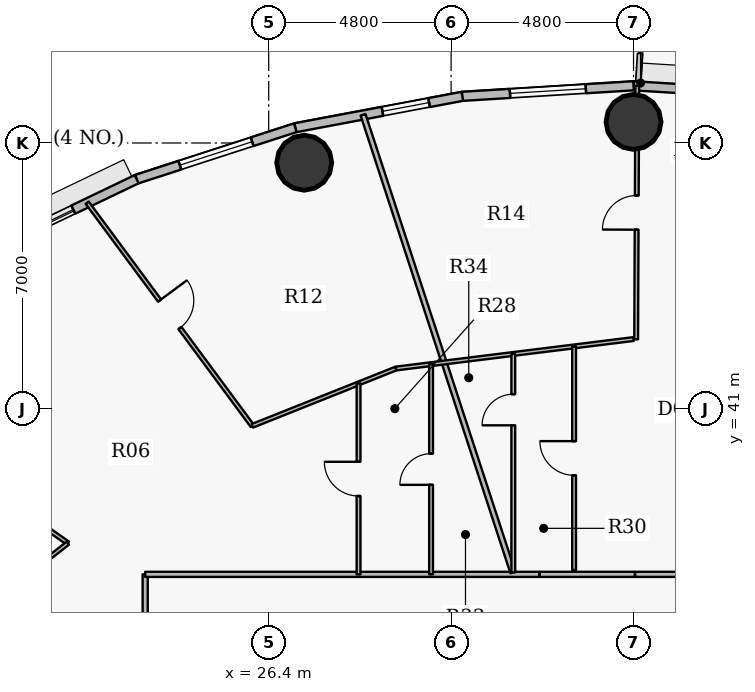
"""IFC4 building model, lengths in metres.
Left out: names, types, materials, properties, quantities, classifications, styles, units other than length and angle.
Written with IfcOpenShell. Run it as: python <this file> out.ifc"""

import sys

from ifc_helpers import new_model, si_unit, direction, frame, frame_2d, origin, origin_2d, place, context, subcontext, project, spatial, rectangle, hollow_circle, extrude, source, transform, mapped, element, fill, save


model = new_model("IFC4")
c1 = context("Model", 3, precision=1e-05, world=origin(), true_north=direction((0.0, 1.0)))
c2 = subcontext(c1, "Body", "Model", "MODEL_VIEW")
j1 = project(units=[si_unit("LENGTHUNIT", "METRE"), si_unit("PLANEANGLEUNIT", "RADIAN")], contexts=[c1])
p1 = place(None, origin())
s1 = spatial("IfcSite", under=j1, at=p1, CompositionType="ELEMENT")
p2 = place(p1, origin())
s2 = spatial("IfcBuilding", under=s1, at=p2, CompositionType="ELEMENT")
p3 = place(p2, frame((0.0, 0.0, 108.45)))
s3 = spatial("IfcBuildingStorey", under=s2, at=p3, CompositionType="ELEMENT", Elevation=108.45)
for number, where, z_axis, x_axis in (
    (1, (36.0, 48.555, 0.0), (0.0, 0.0, 1.0), (1.0, 0.0, 0.0)),
    (2, (27.334, 47.481, 0.0), (0.0, 0.0, 1.0), (1.0, 0.0, 0.0)),
):
    element("IfcColumn", number, at=place(p3, frame(where, z_axis=z_axis, x_axis=x_axis)), inside=s3, PredefinedType="COLUMN", context=c2, shape_type="SweptSolid", body=[
        extrude(hollow_circle(Radius=0.725, WallThickness=0.042, at=origin_2d()), origin(), (0.0, 0.0, 1.0), 3.75),
    ])
p4 = place(p3, frame((36.0, 49.505, 0.0), z_axis=(0.0, 0.0, 1.0), x_axis=(0.998107531589, -0.061492726276, 0.0)))
e3 = element("IfcWall", 3, at=p4, inside=s3, PredefinedType="SOLIDWALL", context=c2, shape_type="SweptSolid", body=[
    extrude(rectangle(XDim=4.514, YDim=0.24, at=frame_2d((2.257, 0.0))), origin(), (0.0, 0.0, 1.0), 3.5),
])
p5 = place(p4, frame((1.732, 0.0, 0.0)))
e4 = element("IfcOpeningElement", 4, at=p5, cuts=e3, PredefinedType="OPENING", context=c2, shape_type="SweptSolid", body=[
    extrude(rectangle(XDim=1.05, YDim=2.15, at=origin_2d()), frame((0.525, 0.13, 1.075), z_axis=(0.0, -1.0, 0.0), x_axis=(1.0, 0.0, 0.0)), (0.0, 0.0, 1.0), 0.26),
])
p6 = place(p3, frame((31.494, 49.227, 0.0), z_axis=(0.0, 0.0, 1.0), x_axis=(0.998107531589, 0.061492726276, 0.0)))
e5 = element("IfcWall", 5, at=p6, inside=s3, PredefinedType="SOLIDWALL", context=c2, shape_type="SweptSolid", body=[
    extrude(rectangle(XDim=4.514, YDim=0.24, at=frame_2d((2.257, 0.0))), origin(), (0.0, 0.0, 1.0), 3.5),
])
p7 = place(p6, frame((1.257, 0.0, 0.9)))
e6 = element("IfcOpeningElement", 6, at=p7, cuts=e5, PredefinedType="OPENING", context=c2, shape_type="SweptSolid", body=[
    extrude(rectangle(XDim=2.0, YDim=1.75, at=origin_2d()), frame((1.0, 0.13, 0.875), z_axis=(0.0, -1.0, 0.0), x_axis=(1.0, 0.0, 0.0)), (0.0, 0.0, 1.0), 0.26),
])
p8 = place(p3, frame((27.1, 48.401, 0.0), z_axis=(0.0, 0.0, 1.0), x_axis=(0.982789252177, 0.184730305596, 0.0)))
e7 = element("IfcWall", 7, at=p8, inside=s3, PredefinedType="SOLIDWALL", context=c2, shape_type="SweptSolid", body=[
    extrude(rectangle(XDim=4.471, YDim=0.24, at=frame_2d((2.235, 0.0))), origin(), (0.0, 0.0, 1.0), 3.5),
])
p9 = place(p8, frame((2.333, 0.0, 0.9)))
e8 = element("IfcOpeningElement", 8, at=p9, cuts=e7, PredefinedType="OPENING", context=c2, shape_type="SweptSolid", body=[
    extrude(rectangle(XDim=1.25, YDim=1.65, at=origin_2d()), frame((0.625, 0.13, 0.825), z_axis=(0.0, -1.0, 0.0), x_axis=(1.0, 0.0, 0.0)), (0.0, 0.0, 1.0), 0.26),
])
p10 = place(p3, frame((22.926, 47.047, 0.0), z_axis=(0.0, 0.0, 1.0), x_axis=(0.951211346073, 0.308540070495, 0.0)))
e9 = element("IfcWall", 9, at=p10, inside=s3, PredefinedType="SOLIDWALL", context=c2, shape_type="SweptSolid", body=[
    extrude(rectangle(XDim=4.388, YDim=0.24, at=frame_2d((2.194, 0.0))), origin(), (0.0, 0.0, 1.0), 3.5),
])
p11 = place(p10, frame((1.194, 0.0, 0.9)))
e10 = element("IfcOpeningElement", 10, at=p11, cuts=e9, PredefinedType="OPENING", context=c2, shape_type="SweptSolid", body=[
    extrude(rectangle(XDim=2.0, YDim=1.75, at=origin_2d()), frame((1.0, 0.13, 0.875), z_axis=(0.0, -1.0, 0.0), x_axis=(1.0, 0.0, 0.0)), (0.0, 0.0, 1.0), 0.26),
])
p12 = place(p3, frame((19.075, 45.199, 0.0), z_axis=(0.0, 0.0, 1.0), x_axis=(0.901589935876, 0.432591709962, 0.0)))
e11 = element("IfcWall", 11, at=p12, inside=s3, PredefinedType="SOLIDWALL", context=c2, shape_type="SweptSolid", body=[
    extrude(rectangle(XDim=4.272, YDim=0.24, at=frame_2d((2.136, 0.0))), origin(), (0.0, 0.0, 1.0), 3.5),
])
p13 = place(p12, frame((0.822, 0.0, 0.9)))
e12 = element("IfcOpeningElement", 12, at=p13, cuts=e11, PredefinedType="OPENING", context=c2, shape_type="SweptSolid", body=[
    extrude(rectangle(XDim=1.6, YDim=1.75, at=origin_2d()), frame((0.8, 0.13, 0.875), z_axis=(0.0, -1.0, 0.0), x_axis=(1.0, 0.0, 0.0)), (0.0, 0.0, 1.0), 0.26),
])
p14 = place(p3, frame((14.661, 42.011, 0.0), z_axis=(0.0, 0.0, 1.0), x_axis=(0.817899711196, -0.575360810645, 0.0)))
e13 = element("IfcWall", 13, at=p14, inside=s3, PredefinedType="PARTITIONING", context=c2, shape_type="SweptSolid", body=[
    extrude(rectangle(XDim=7.891, YDim=0.1, at=frame_2d((3.945, 0.0))), origin(), (0.0, 0.0, 1.0), 2.935),
])
p15 = place(p14, frame((3.495, 0.0, 0.0)))
e14 = element("IfcOpeningElement", 14, at=p15, cuts=e13, PredefinedType="OPENING", context=c2, shape_type="SweptSolid", body=[
    extrude(rectangle(XDim=0.9, YDim=2.1, at=origin_2d()), frame((0.45, 0.06, 1.05), z_axis=(0.0, -1.0, 0.0), x_axis=(1.0, 0.0, 0.0)), (0.0, 0.0, 1.0), 0.12),
])
p16 = place(p3, frame((19.634, 36.311, 0.0), z_axis=(0.0, 0.0, 1.0), x_axis=(0.787307829703, 0.616560119768, 0.0)))
e15 = element("IfcWall", 15, at=p16, inside=s3, PredefinedType="PARTITIONING", context=c2, shape_type="SweptSolid", body=[
    extrude(rectangle(XDim=1.882, YDim=0.1, at=frame_2d((0.941, 0.0))), origin(), (0.0, 0.0, 1.0), 3.5),
])
p17 = place(p3, frame((21.624, 46.428, 0.0), z_axis=(0.0, 0.0, 1.0), x_axis=(0.594804555611, -0.803870350631, 0.0)))
e16 = element("IfcWall", 16, at=p17, inside=s3, PredefinedType="PARTITIONING", context=c2, shape_type="SweptSolid", body=[
    extrude(rectangle(XDim=7.303, YDim=0.1, at=frame_2d((3.652, 0.0))), origin(), (0.0, 0.0, 1.0), 2.935),
])
p18 = place(p17, frame((3.202, 0.0, 0.0)))
e17 = element("IfcOpeningElement", 17, at=p18, cuts=e16, PredefinedType="OPENING", context=c2, shape_type="SweptSolid", body=[
    extrude(rectangle(XDim=0.9, YDim=2.1, at=origin_2d()), frame((0.45, 0.06, 1.05), z_axis=(0.0, -1.0, 0.0), x_axis=(1.0, 0.0, 0.0)), (0.0, 0.0, 1.0), 0.12),
])
p19 = place(p3, frame((23.15, 17.35, 0.0), z_axis=(0.0, 0.0, 1.0), x_axis=(0.0, 1.0, 0.0)))
e18 = element("IfcWall", 18, at=p19, inside=s3, PredefinedType="PARTITIONING", context=c2, shape_type="SweptSolid", body=[
    extrude(rectangle(XDim=19.3, YDim=0.135, at=frame_2d((9.65, 0.0))), origin(), (0.0, 0.0, 1.0), 2.935),
])
p20 = place(p19, frame((15.889, 0.0, 0.0)))
e19 = element("IfcOpeningElement", 19, at=p20, cuts=e18, PredefinedType="OPENING", context=c2, shape_type="SweptSolid", body=[
    extrude(rectangle(XDim=1.0, YDim=2.15, at=origin_2d()), frame((0.5, 0.078, 1.075), z_axis=(0.0, -1.0, 0.0), x_axis=(1.0, 0.0, 0.0)), (0.0, 0.0, 1.0), 0.155),
])
p21 = place(p19, frame((6.279, 0.0, 0.0)))
e20 = element("IfcOpeningElement", 20, at=p21, cuts=e18, PredefinedType="OPENING", context=c2, shape_type="SweptSolid", body=[
    extrude(rectangle(XDim=1.0, YDim=2.15, at=origin_2d()), frame((0.5, 0.078, 1.075), z_axis=(0.0, -1.0, 0.0), x_axis=(1.0, 0.0, 0.0)), (0.0, 0.0, 1.0), 0.155),
])
p22 = place(p3, frame((23.15, 36.65, 0.0), z_axis=(0.0, 0.0, 1.0), x_axis=(1.0, 0.0, 0.0)))
e21 = element("IfcWall", 21, at=p22, inside=s3, PredefinedType="PARTITIONING", context=c2, shape_type="SweptSolid", body=[
    extrude(rectangle(XDim=10.373, YDim=0.135, at=frame_2d((5.187, 0.0))), origin(), (0.0, 0.0, 1.0), 2.935),
])
p23 = place(p3, frame((25.968, 40.557, 0.0), z_axis=(0.0, 0.0, 1.0), x_axis=(0.928807252466, 0.37056320347, 0.0)))
e22 = element("IfcWall", 22, at=p23, inside=s3, PredefinedType="PARTITIONING", context=c2, shape_type="SweptSolid", body=[
    extrude(rectangle(XDim=4.07, YDim=0.1, at=frame_2d((2.035, 0.0))), origin(), (0.0, 0.0, 1.0), 2.935),
])
p24 = place(p3, frame((28.764, 36.65, 0.0), z_axis=(0.0, 0.0, 1.0), x_axis=(0.0, 1.0, 0.0)))
e23 = element("IfcWall", 23, at=p24, inside=s3, PredefinedType="PARTITIONING", context=c2, shape_type="SweptSolid", body=[
    extrude(rectangle(XDim=5.023, YDim=0.1, at=frame_2d((2.511, 0.0))), origin(), (0.0, 0.0, 1.0), 3.5),
])
p25 = place(p24, frame((2.062, 0.0, 0.0)))
e24 = element("IfcOpeningElement", 24, at=p25, cuts=e23, PredefinedType="OPENING", context=c2, shape_type="SweptSolid", body=[
    extrude(rectangle(XDim=0.9, YDim=2.1, at=origin_2d()), frame((0.45, 0.06, 1.05), z_axis=(0.0, -1.0, 0.0), x_axis=(1.0, 0.0, 0.0)), (0.0, 0.0, 1.0), 0.12),
])
p26 = place(p3, frame((28.883, 48.741, 0.0), z_axis=(0.0, 0.0, 1.0), x_axis=(0.311090320612, -0.95038035145, 0.0)))
e25 = element("IfcWall", 25, at=p26, inside=s3, PredefinedType="PARTITIONING", context=c2, shape_type="SweptSolid", body=[
    extrude(rectangle(XDim=12.671, YDim=0.135, at=frame_2d((6.335, 0.0))), origin(), (0.0, 0.0, 1.0), 2.935),
])
p27 = place(p3, frame((29.749, 42.066, 0.0), z_axis=(0.0, 0.0, 1.0), x_axis=(0.992395485088, 0.123090215599, 0.0)))
e26 = element("IfcWall", 26, at=p27, inside=s3, PredefinedType="PARTITIONING", context=c2, shape_type="SweptSolid", body=[
    extrude(rectangle(XDim=6.299, YDim=0.1, at=frame_2d((3.15, 0.0))), origin(), (0.0, 0.0, 1.0), 2.935),
])
p28 = place(p3, frame((30.673, 36.65, 0.0), z_axis=(0.0, 0.0, 1.0), x_axis=(0.0, 1.0, 0.0)))
e27 = element("IfcWall", 27, at=p28, inside=s3, PredefinedType="PARTITIONING", context=c2, shape_type="SweptSolid", body=[
    extrude(rectangle(XDim=5.53, YDim=0.1, at=frame_2d((2.765, 0.0))), origin(), (0.0, 0.0, 1.0), 2.935),
])
p29 = place(p28, frame((2.355, 0.0, 0.0)))
e28 = element("IfcOpeningElement", 28, at=p29, cuts=e27, PredefinedType="OPENING", context=c2, shape_type="SweptSolid", body=[
    extrude(rectangle(XDim=0.82, YDim=2.1, at=origin_2d()), frame((0.41, 0.06, 1.05), z_axis=(0.0, -1.0, 0.0), x_axis=(1.0, 0.0, 0.0)), (0.0, 0.0, 1.0), 0.12),
])
p30 = place(p3, frame((32.836, 36.701, 0.0), z_axis=(0.0, 0.0, 1.0), x_axis=(0.0, 1.0, 0.0)))
e29 = element("IfcWall", 29, at=p30, inside=s3, PredefinedType="PARTITIONING", context=c2, shape_type="SweptSolid", body=[
    extrude(rectangle(XDim=5.748, YDim=0.1, at=frame_2d((2.874, 0.0))), origin(), (0.0, 0.0, 1.0), 3.125),
])
p31 = place(p30, frame((3.87, 0.0, 0.0)))
e30 = element("IfcOpeningElement", 30, at=p31, cuts=e29, PredefinedType="OPENING", context=c2, shape_type="SweptSolid", body=[
    extrude(rectangle(XDim=0.82, YDim=2.1, at=origin_2d()), frame((0.41, 0.06, 1.05), z_axis=(0.0, -1.0, 0.0), x_axis=(1.0, 0.0, 0.0)), (0.0, 0.0, 1.0), 0.12),
])
p32 = place(p3, frame((34.436, 36.763, 0.0), z_axis=(0.0, 0.0, 1.0), x_axis=(0.0, 1.0, 0.0)))
e31 = element("IfcWall", 31, at=p32, inside=s3, PredefinedType="PARTITIONING", context=c2, shape_type="SweptSolid", body=[
    extrude(rectangle(XDim=5.884, YDim=0.1, at=frame_2d((2.942, 0.0))), origin(), (0.0, 0.0, 1.0), 3.125),
])
p33 = place(p32, frame((2.492, 0.0, 0.0)))
e32 = element("IfcOpeningElement", 32, at=p33, cuts=e31, PredefinedType="OPENING", context=c2, shape_type="SweptSolid", body=[
    extrude(rectangle(XDim=0.9, YDim=2.1, at=origin_2d()), frame((0.45, 0.06, 1.05), z_axis=(0.0, -1.0, 0.0), x_axis=(1.0, 0.0, 0.0)), (0.0, 0.0, 1.0), 0.12),
])
p34 = place(p3, frame((36.042, 36.65, 0.0), z_axis=(0.0, 0.0, 1.0), x_axis=(1.0, 0.0, 0.0)))
e33 = element("IfcWall", 33, at=p34, inside=s3, PredefinedType="PARTITIONING", context=c2, shape_type="SweptSolid", body=[
    extrude(rectangle(XDim=12.808, YDim=0.135, at=frame_2d((6.404, 0.0))), origin(), (0.0, 0.0, 1.0), 2.935),
])
p35 = place(p34, frame((3.135, 0.0, 0.0)))
e34 = element("IfcOpeningElement", 34, at=p35, cuts=e33, PredefinedType="OPENING", context=c2, shape_type="SweptSolid", body=[
    extrude(rectangle(XDim=1.0, YDim=2.15, at=origin_2d()), frame((0.5, 0.078, 1.075), z_axis=(0.0, -1.0, 0.0), x_axis=(1.0, 0.0, 0.0)), (0.0, 0.0, 1.0), 0.155),
])
p36 = place(p3, frame((36.069, 42.833, 0.0), z_axis=(0.0, 0.0, 1.0), x_axis=(0.004354785612, 0.999990517876, 0.0)))
e35 = element("IfcWall", 35, at=p36, inside=s3, PredefinedType="PARTITIONING", context=c2, shape_type="SweptSolid", body=[
    extrude(rectangle(XDim=6.671, YDim=0.1, at=frame_2d((3.336, 0.0))), origin(), (0.0, 0.0, 1.0), 2.935),
])
p37 = place(p36, frame((2.886, 0.0, 0.0)))
e36 = element("IfcOpeningElement", 36, at=p37, cuts=e35, PredefinedType="OPENING", context=c2, shape_type="SweptSolid", body=[
    extrude(rectangle(XDim=0.9, YDim=2.1, at=origin_2d()), frame((0.45, 0.06, 1.05), z_axis=(0.0, -1.0, 0.0), x_axis=(1.0, 0.0, 0.0)), (0.0, 0.0, 1.0), 0.12),
])
p38 = place(p3, frame((33.533, 36.65, 0.0), z_axis=(0.0, 0.0, 1.0), x_axis=(1.0, 0.0, 0.0)))
e37 = element("IfcWall", 37, at=p38, inside=s3, PredefinedType="PARTITIONING", context=c2, shape_type="SweptSolid", body=[
    extrude(rectangle(XDim=2.499, YDim=0.135, at=frame_2d((1.25, 0.0))), origin(), (0.0, 0.0, 1.0), 2.935),
])
m1 = source(origin(), c2, "Body", "SweptSolid", [
    extrude(rectangle(XDim=2.0, YDim=1.75, at=origin_2d()), frame((1.0, 0.03, 0.875), z_axis=(0.0, -1.0, 0.0), x_axis=(1.0, 0.0, 0.0)), (0.0, 0.0, 1.0), 0.06),
])
p39 = place(p7, origin())
e38 = element("IfcWindow", 38, at=p39, inside=s3, PartitioningType="DOUBLE_PANEL_VERTICAL", PredefinedType="WINDOW", context=c2, shape_type="MappedRepresentation", body=[
    mapped(m1, transform((0.0, 0.0, 0.0), x_axis=(1.0, 0.0, 0.0), y_axis=(0.0, 1.0, 0.0), z_axis=(0.0, 0.0, 1.0), scale=1.0)),
])
fill(e6, e38)
m2 = source(origin(), c2, "Body", "SweptSolid", [
    extrude(rectangle(XDim=1.25, YDim=1.65, at=origin_2d()), frame((0.625, 0.03, 0.825), z_axis=(0.0, -1.0, 0.0), x_axis=(1.0, 0.0, 0.0)), (0.0, 0.0, 1.0), 0.06),
])
p40 = place(p9, origin())
e39 = element("IfcWindow", 39, at=p40, inside=s3, PartitioningType="SINGLE_PANEL", PredefinedType="WINDOW", context=c2, shape_type="MappedRepresentation", body=[
    mapped(m2, transform((0.0, 0.0, 0.0), x_axis=(1.0, 0.0, 0.0), y_axis=(0.0, 1.0, 0.0), z_axis=(0.0, 0.0, 1.0), scale=1.0)),
])
fill(e8, e39)
p41 = place(p11, origin())
e40 = element("IfcWindow", 40, at=p41, inside=s3, PartitioningType="DOUBLE_PANEL_VERTICAL", PredefinedType="WINDOW", context=c2, shape_type="MappedRepresentation", body=[
    mapped(m1, transform((0.0, 0.0, 0.0), x_axis=(1.0, 0.0, 0.0), y_axis=(0.0, 1.0, 0.0), z_axis=(0.0, 0.0, 1.0), scale=1.0)),
])
fill(e10, e40)
m3 = source(origin(), c2, "Body", "SweptSolid", [
    extrude(rectangle(XDim=1.6, YDim=1.75, at=origin_2d()), frame((0.8, 0.03, 0.875), z_axis=(0.0, -1.0, 0.0), x_axis=(1.0, 0.0, 0.0)), (0.0, 0.0, 1.0), 0.06),
])
p42 = place(p13, origin())
e41 = element("IfcWindow", 41, at=p42, inside=s3, PartitioningType="DOUBLE_PANEL_VERTICAL", PredefinedType="WINDOW", context=c2, shape_type="MappedRepresentation", body=[
    mapped(m3, transform((0.0, 0.0, 0.0), x_axis=(1.0, 0.0, 0.0), y_axis=(0.0, 1.0, 0.0), z_axis=(0.0, 0.0, 1.0), scale=1.0)),
])
fill(e12, e41)
m4 = source(origin(), c2, "Body", "SweptSolid", [
    extrude(rectangle(XDim=0.9, YDim=2.1, at=origin_2d()), frame((0.45, 0.025, 1.05), z_axis=(0.0, -1.0, 0.0), x_axis=(1.0, 0.0, 0.0)), (0.0, 0.0, 1.0), 0.05),
])
p43 = place(p37, origin())
e42 = element("IfcDoor", 42, at=p43, inside=s3, OperationType="SINGLE_SWING_LEFT", PredefinedType="DOOR", context=c2, shape_type="MappedRepresentation", body=[
    mapped(m4, transform((0.0, 0.0, 0.0), x_axis=(1.0, 0.0, 0.0), y_axis=(0.0, 1.0, 0.0), z_axis=(0.0, 0.0, 1.0), scale=1.0)),
])
fill(e36, e42)
p44 = place(p33, origin())
e43 = element("IfcDoor", 43, at=p44, inside=s3, OperationType="SINGLE_SWING_RIGHT", PredefinedType="DOOR", context=c2, shape_type="MappedRepresentation", body=[
    mapped(m4, transform((0.0, 0.0, 0.0), x_axis=(1.0, 0.0, 0.0), y_axis=(0.0, 1.0, 0.0), z_axis=(0.0, 0.0, 1.0), scale=1.0)),
])
fill(e32, e43)
m5 = source(origin(), c2, "Body", "SweptSolid", [
    extrude(rectangle(XDim=0.82, YDim=2.1, at=origin_2d()), frame((0.41, 0.025, 1.05), z_axis=(0.0, -1.0, 0.0), x_axis=(1.0, 0.0, 0.0)), (0.0, 0.0, 1.0), 0.05),
])
p45 = place(p31, origin())
e44 = element("IfcDoor", 44, at=p45, inside=s3, OperationType="SINGLE_SWING_LEFT", PredefinedType="DOOR", context=c2, shape_type="MappedRepresentation", body=[
    mapped(m5, transform((0.0, 0.0, 0.0), x_axis=(1.0, 0.0, 0.0), y_axis=(0.0, 1.0, 0.0), z_axis=(0.0, 0.0, 1.0), scale=1.0)),
])
fill(e30, e44)
p46 = place(p18, origin())
e45 = element("IfcDoor", 45, at=p46, inside=s3, OperationType="SINGLE_SWING_LEFT", PredefinedType="DOOR", context=c2, shape_type="MappedRepresentation", body=[
    mapped(m4, transform((0.0, 0.0, 0.0), x_axis=(1.0, 0.0, 0.0), y_axis=(0.0, 1.0, 0.0), z_axis=(0.0, 0.0, 1.0), scale=1.0)),
])
fill(e17, e45)
p47 = place(p25, origin())
e46 = element("IfcDoor", 46, at=p47, inside=s3, OperationType="SINGLE_SWING_RIGHT", PredefinedType="DOOR", context=c2, shape_type="MappedRepresentation", body=[
    mapped(m4, transform((0.0, 0.0, 0.0), x_axis=(1.0, 0.0, 0.0), y_axis=(0.0, 1.0, 0.0), z_axis=(0.0, 0.0, 1.0), scale=1.0)),
])
fill(e24, e46)
p48 = place(p29, origin())
e47 = element("IfcDoor", 47, at=p48, inside=s3, OperationType="SINGLE_SWING_LEFT", PredefinedType="DOOR", context=c2, shape_type="MappedRepresentation", body=[
    mapped(m5, transform((0.0, 0.0, 0.0), x_axis=(1.0, 0.0, 0.0), y_axis=(0.0, 1.0, 0.0), z_axis=(0.0, 0.0, 1.0), scale=1.0)),
])
fill(e28, e47)
save(model, sys.argv[1])
